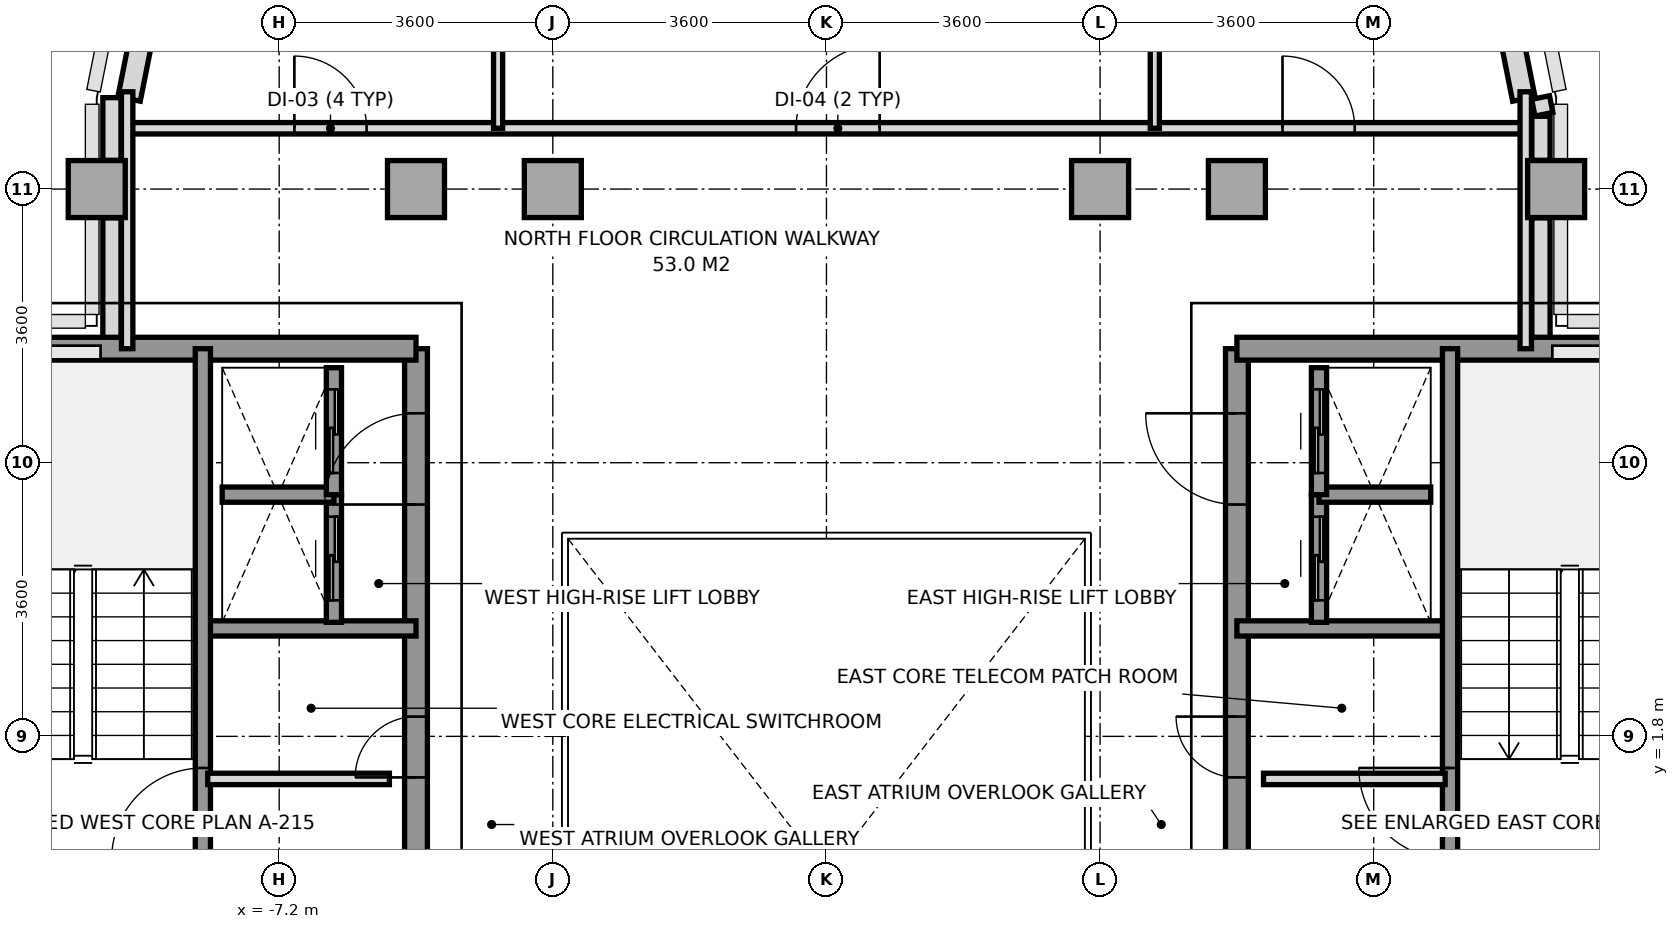
"""IFC4 building model, lengths in metres.
Left out: names, types, materials, properties, quantities, classifications, styles, units other than length and angle.
Written with IfcOpenShell. Run it as: python <this file> out.ifc"""

import sys

from ifc_helpers import new_model, si_unit, direction, frame, frame_2d, origin, origin_2d, place, context, subcontext, project, spatial, rectangle, extrude, source, transform, mapped, element, fill, save


model = new_model("IFC4")
c1 = context("Model", 3, precision=1e-05, world=origin(), true_north=direction((0.0, 1.0)))
c2 = subcontext(c1, "Body", "Model", "MODEL_VIEW")
j1 = project(units=[si_unit("LENGTHUNIT", "METRE"), si_unit("PLANEANGLEUNIT", "RADIAN")], contexts=[c1])
p1 = place(None, origin())
s1 = spatial("IfcSite", under=j1, at=p1, CompositionType="ELEMENT")
p2 = place(p1, origin())
s2 = spatial("IfcBuilding", under=s1, at=p2, CompositionType="ELEMENT")
p3 = place(p2, frame((0.0, 0.0, 268.4)))
s3 = spatial("IfcBuildingStorey", under=s2, at=p3, CompositionType="ELEMENT", Elevation=268.4)
m1 = source(origin(), c2, "Body", "SweptSolid", [
    extrude(rectangle(XDim=0.75, YDim=0.75, at=origin_2d()), origin(), (0.0, 0.0, 1.0), 2.96),
])
for number, where, z_axis, x_axis in (
    (1, (-9.6, 9.0, 0.0), (0.0, 0.0, 1.0), (1.0, 0.0, 0.0)),
    (2, (-5.4, 9.0, 0.0), (0.0, 0.0, 1.0), (1.0, 0.0, 0.0)),
    (3, (-3.6, 9.0, 0.0), (0.0, 0.0, 1.0), (1.0, 0.0, 0.0)),
    (4, (3.6, 9.0, 0.0), (0.0, 0.0, 1.0), (1.0, 0.0, 0.0)),
    (5, (5.4, 9.0, 0.0), (0.0, 0.0, 1.0), (1.0, 0.0, 0.0)),
    (6, (9.6, 9.0, 0.0), (0.0, 0.0, 1.0), (1.0, 0.0, 0.0)),
):
    element("IfcColumn", number, at=place(p3, frame(where, z_axis=z_axis, x_axis=x_axis)), inside=s3, PredefinedType="COLUMN", context=c2, shape_type="MappedRepresentation", body=[
        mapped(m1, transform((0.0, 0.0, 0.0), x_axis=(1.0, 0.0, 0.0), y_axis=(0.0, 1.0, 0.0), z_axis=(0.0, 0.0, 1.0), scale=1.0)),
    ])
for number, where, z_axis, x_axis in (
    (7, (9.175, 10.185, 0.0), (0.0, 0.0, 1.0), (-0.195, 0.981, 0.0)),
    (8, (-8.471, 13.725, 0.0), (0.0, 0.0, 1.0), (-0.195, -0.981, 0.0)),
):
    element("IfcWall", number, at=place(p3, frame(where, z_axis=z_axis, x_axis=x_axis)), inside=s3, PredefinedType="SOLIDWALL", context=c2, shape_type="SweptSolid", body=[
        extrude(rectangle(XDim=3.609, YDim=0.3, at=frame_2d((1.804, 0.0))), origin(), (0.0, 0.0, 1.0), 2.96),
    ])
p4 = place(p3, frame((-9.4, 6.953, 0.0), z_axis=(0.0, 0.0, 1.0), x_axis=(0.0, 1.0, 0.0)))
e9 = element("IfcWall", 9, at=p4, inside=s3, PredefinedType="PARAPET", context=c2, shape_type="SweptSolid", body=[
    extrude(rectangle(XDim=1.669, YDim=0.24, at=frame_2d((0.834, 0.0))), origin(), (0.0, 0.0, 1.0), 1.15),
])
p5 = place(p3, frame((-9.4, 9.378, 0.0), z_axis=(0.0, 0.0, 1.0), x_axis=(0.0, 1.0, 0.0)))
e10 = element("IfcWall", 10, at=p5, inside=s3, PredefinedType="PARAPET", context=c2, shape_type="SweptSolid", body=[
    extrude(rectangle(XDim=0.825, YDim=0.24, at=frame_2d((0.413, 0.0))), origin(), (0.0, 0.0, 1.0), 1.15),
])
p6 = place(p3, frame((9.395, 10.204, 0.0), z_axis=(0.0, 0.0, 1.0), x_axis=(0.194859894132, -0.980831087221, 0.0)))
e11 = element("IfcWall", 11, at=p6, inside=s3, PredefinedType="PARAPET", context=c2, shape_type="SweptSolid", body=[
    extrude(rectangle(XDim=0.224, YDim=0.24, at=frame_2d((0.112, 0.0))), origin(), (0.0, 0.0, 1.0), 1.15),
])
p7 = place(p3, frame((9.4, 9.958, 0.0), z_axis=(0.0, 0.0, 1.0), x_axis=(0.0, -1.0, 0.0)))
e12 = element("IfcWall", 12, at=p7, inside=s3, PredefinedType="PARAPET", context=c2, shape_type="SweptSolid", body=[
    extrude(rectangle(XDim=0.58, YDim=0.24, at=frame_2d((0.29, 0.0))), origin(), (0.0, 0.0, 1.0), 1.15),
])
p8 = place(p3, frame((9.4, 8.622, 0.0), z_axis=(0.0, 0.0, 1.0), x_axis=(0.0, -1.0, 0.0)))
e13 = element("IfcWall", 13, at=p8, inside=s3, PredefinedType="PARAPET", context=c2, shape_type="SweptSolid", body=[
    extrude(rectangle(XDim=1.669, YDim=0.24, at=frame_2d((0.834, 0.0))), origin(), (0.0, 0.0, 1.0), 1.15),
])
p9 = place(p3, frame((-5.4, -5.6, 0.0), z_axis=(0.0, 0.0, 1.0), x_axis=(0.0, 1.0, 0.0)))
e14 = element("IfcWall", 14, at=p9, inside=s3, PredefinedType="SHEAR", context=c2, shape_type="SweptSolid", body=[
    extrude(rectangle(XDim=12.5, YDim=0.3, at=frame_2d((6.25, 0.0))), origin(), (0.0, 0.0, 1.0), 2.96),
])
p10 = place(p9, frame((4.55, 0.0, 0.0)))
e15 = element("IfcOpeningElement", 15, at=p10, cuts=e14, PredefinedType="OPENING", context=c2, shape_type="SweptSolid", body=[
    extrude(rectangle(XDim=1.2, YDim=2.2, at=frame_2d((0.6, 1.1))), frame((0.0, 0.16, 0.0), z_axis=(0.0, -1.0, 0.0), x_axis=(1.0, 0.0, 0.0)), (0.0, 0.0, 1.0), 0.32),
])
p11 = place(p9, frame((10.45, 0.0, 0.0)))
e16 = element("IfcOpeningElement", 16, at=p11, cuts=e14, PredefinedType="OPENING", context=c2, shape_type="SweptSolid", body=[
    extrude(rectangle(XDim=1.2, YDim=2.2, at=frame_2d((0.6, 1.1))), frame((0.0, 0.16, 0.0), z_axis=(0.0, -1.0, 0.0), x_axis=(1.0, 0.0, 0.0)), (0.0, 0.0, 1.0), 0.32),
])
p12 = place(p9, frame((6.86, 0.0, 0.0)))
e17 = element("IfcOpeningElement", 17, at=p12, cuts=e14, PredefinedType="OPENING", context=c2, shape_type="SweptSolid", body=[
    extrude(rectangle(XDim=0.8, YDim=2.1, at=frame_2d((0.4, 1.05))), frame((0.0, 0.16, 0.0), z_axis=(0.0, -1.0, 0.0), x_axis=(1.0, 0.0, 0.0)), (0.0, 0.0, 1.0), 0.32),
])
p13 = place(p3, frame((-11.356, 6.9, 0.0), z_axis=(0.0, 0.0, 1.0), x_axis=(1.0, 0.0, 0.0)))
e18 = element("IfcWall", 18, at=p13, inside=s3, PredefinedType="SHEAR", context=c2, shape_type="SweptSolid", body=[
    extrude(rectangle(XDim=5.956, YDim=0.3, at=frame_2d((2.978, 0.0))), origin(), (0.0, 0.0, 1.0), 2.96),
])
p14 = place(p3, frame((-8.18, 3.22, 0.0), z_axis=(0.0, 0.0, 1.0), x_axis=(1.0, 0.0, 0.0)))
e19 = element("IfcWall", 19, at=p14, inside=s3, PredefinedType="SOLIDWALL", context=c2, shape_type="SweptSolid", body=[
    extrude(rectangle(XDim=2.78, YDim=0.2, at=frame_2d((1.39, 0.0))), origin(), (0.0, 0.0, 1.0), 2.96),
])
p15 = place(p3, frame((-8.204, -0.016, 0.0), z_axis=(0.0, 0.0, 1.0), x_axis=(0.0, 1.0, 0.0)))
e20 = element("IfcWall", 20, at=p15, inside=s3, PredefinedType="SOLIDWALL", context=c2, shape_type="SweptSolid", body=[
    extrude(rectangle(XDim=6.916, YDim=0.2, at=frame_2d((3.458, 0.0))), origin(), (0.0, 0.0, 1.0), 2.96),
])
p16 = place(p15, frame((0.2, 0.0, 0.0)))
e21 = element("IfcOpeningElement", 21, at=p16, cuts=e20, PredefinedType="OPENING", context=c2, shape_type="SweptSolid", body=[
    extrude(rectangle(XDim=1.2, YDim=2.2, at=frame_2d((0.6, 1.1))), frame((0.0, 0.11, 0.0), z_axis=(0.0, -1.0, 0.0), x_axis=(1.0, 0.0, 0.0)), (0.0, 0.0, 1.0), 0.22),
])
p17 = place(p3, frame((5.4, -5.6, 0.0), z_axis=(0.0, 0.0, 1.0), x_axis=(0.0, 1.0, 0.0)))
e22 = element("IfcWall", 22, at=p17, inside=s3, PredefinedType="SHEAR", context=c2, shape_type="SweptSolid", body=[
    extrude(rectangle(XDim=12.5, YDim=0.3, at=frame_2d((6.25, 0.0))), origin(), (0.0, 0.0, 1.0), 2.96),
])
p18 = place(p17, frame((4.55, 0.0, 0.0)))
e23 = element("IfcOpeningElement", 23, at=p18, cuts=e22, PredefinedType="OPENING", context=c2, shape_type="SweptSolid", body=[
    extrude(rectangle(XDim=1.2, YDim=2.2, at=frame_2d((0.6, 1.1))), frame((0.0, 0.16, 0.0), z_axis=(0.0, -1.0, 0.0), x_axis=(1.0, 0.0, 0.0)), (0.0, 0.0, 1.0), 0.32),
])
p19 = place(p17, frame((10.45, 0.0, 0.0)))
e24 = element("IfcOpeningElement", 24, at=p19, cuts=e22, PredefinedType="OPENING", context=c2, shape_type="SweptSolid", body=[
    extrude(rectangle(XDim=1.2, YDim=2.2, at=frame_2d((0.6, 1.1))), frame((0.0, 0.16, 0.0), z_axis=(0.0, -1.0, 0.0), x_axis=(1.0, 0.0, 0.0)), (0.0, 0.0, 1.0), 0.32),
])
p20 = place(p17, frame((6.86, 0.0, 0.0)))
e25 = element("IfcOpeningElement", 25, at=p20, cuts=e22, PredefinedType="OPENING", context=c2, shape_type="SweptSolid", body=[
    extrude(rectangle(XDim=0.8, YDim=2.1, at=frame_2d((0.4, 1.05))), frame((0.0, 0.16, 0.0), z_axis=(0.0, -1.0, 0.0), x_axis=(1.0, 0.0, 0.0)), (0.0, 0.0, 1.0), 0.32),
])
p21 = place(p3, frame((5.4, 6.9, 0.0), z_axis=(0.0, 0.0, 1.0), x_axis=(1.0, 0.0, 0.0)))
e26 = element("IfcWall", 26, at=p21, inside=s3, PredefinedType="SHEAR", context=c2, shape_type="SweptSolid", body=[
    extrude(rectangle(XDim=5.956, YDim=0.3, at=frame_2d((2.978, 0.0))), origin(), (0.0, 0.0, 1.0), 2.96),
])
p22 = place(p3, frame((5.4, 3.22, 0.0), z_axis=(0.0, 0.0, 1.0), x_axis=(1.0, 0.0, 0.0)))
e27 = element("IfcWall", 27, at=p22, inside=s3, PredefinedType="SOLIDWALL", context=c2, shape_type="SweptSolid", body=[
    extrude(rectangle(XDim=2.78, YDim=0.2, at=frame_2d((1.39, 0.0))), origin(), (0.0, 0.0, 1.0), 2.96),
])
p23 = place(p3, frame((8.204, -0.016, 0.0), z_axis=(0.0, 0.0, 1.0), x_axis=(0.0, 1.0, 0.0)))
e28 = element("IfcWall", 28, at=p23, inside=s3, PredefinedType="SOLIDWALL", context=c2, shape_type="SweptSolid", body=[
    extrude(rectangle(XDim=6.916, YDim=0.2, at=frame_2d((3.458, 0.0))), origin(), (0.0, 0.0, 1.0), 2.96),
])
p24 = place(p23, frame((0.2, 0.0, 0.0)))
e29 = element("IfcOpeningElement", 29, at=p24, cuts=e28, PredefinedType="OPENING", context=c2, shape_type="SweptSolid", body=[
    extrude(rectangle(XDim=1.2, YDim=2.2, at=frame_2d((0.6, 1.1))), frame((0.0, 0.11, 0.0), z_axis=(0.0, -1.0, 0.0), x_axis=(1.0, 0.0, 0.0)), (0.0, 0.0, 1.0), 0.22),
])
p25 = place(p3, frame((-6.48, 3.3, 0.0), z_axis=(0.0, 0.0, 1.0), x_axis=(0.0, 1.0, 0.0)))
e30 = element("IfcWall", 30, at=p25, inside=s3, PredefinedType="SOLIDWALL", context=c2, shape_type="SweptSolid", body=[
    extrude(rectangle(XDim=1.68, YDim=0.2, at=frame_2d((0.84, 0.0))), origin(), (0.0, 0.0, 1.0), 2.96),
])
p26 = place(p25, frame((0.29, 0.0, 0.0)))
e31 = element("IfcOpeningElement", 31, at=p26, cuts=e30, PredefinedType="OPENING", context=c2, shape_type="SweptSolid", body=[
    extrude(rectangle(XDim=1.1, YDim=2.2, at=frame_2d((0.55, 1.1))), frame((0.0, 0.11, 0.0), z_axis=(0.0, -1.0, 0.0), x_axis=(1.0, 0.0, 0.0)), (0.0, 0.0, 1.0), 0.22),
])
p27 = place(p3, frame((-7.95, 4.98, 0.0), z_axis=(0.0, 0.0, 1.0), x_axis=(1.0, 0.0, 0.0)))
e32 = element("IfcWall", 32, at=p27, inside=s3, PredefinedType="SOLIDWALL", context=c2, shape_type="SweptSolid", body=[
    extrude(rectangle(XDim=1.47, YDim=0.2, at=frame_2d((0.735, 0.0))), origin(), (0.0, 0.0, 1.0), 2.96),
])
p28 = place(p3, frame((-6.48, 4.98, 0.0), z_axis=(0.0, 0.0, 1.0), x_axis=(0.0, 1.0, 0.0)))
e33 = element("IfcWall", 33, at=p28, inside=s3, PredefinedType="SOLIDWALL", context=c2, shape_type="SweptSolid", body=[
    extrude(rectangle(XDim=1.67, YDim=0.2, at=frame_2d((0.835, 0.0))), origin(), (0.0, 0.0, 1.0), 2.96),
])
p29 = place(p28, frame((0.285, 0.0, 0.0)))
e34 = element("IfcOpeningElement", 34, at=p29, cuts=e33, PredefinedType="OPENING", context=c2, shape_type="SweptSolid", body=[
    extrude(rectangle(XDim=1.1, YDim=2.2, at=frame_2d((0.55, 1.1))), frame((0.0, 0.11, 0.0), z_axis=(0.0, -1.0, 0.0), x_axis=(1.0, 0.0, 0.0)), (0.0, 0.0, 1.0), 0.22),
])
p30 = place(p3, frame((6.48, 3.3, 0.0), z_axis=(0.0, 0.0, 1.0), x_axis=(0.0, 1.0, 0.0)))
e35 = element("IfcWall", 35, at=p30, inside=s3, PredefinedType="SOLIDWALL", context=c2, shape_type="SweptSolid", body=[
    extrude(rectangle(XDim=1.68, YDim=0.2, at=frame_2d((0.84, 0.0))), origin(), (0.0, 0.0, 1.0), 2.96),
])
p31 = place(p30, frame((0.29, 0.0, 0.0)))
e36 = element("IfcOpeningElement", 36, at=p31, cuts=e35, PredefinedType="OPENING", context=c2, shape_type="SweptSolid", body=[
    extrude(rectangle(XDim=1.1, YDim=2.2, at=frame_2d((0.55, 1.1))), frame((0.0, 0.11, 0.0), z_axis=(0.0, -1.0, 0.0), x_axis=(1.0, 0.0, 0.0)), (0.0, 0.0, 1.0), 0.22),
])
p32 = place(p3, frame((6.48, 4.98, 0.0), z_axis=(0.0, 0.0, 1.0), x_axis=(1.0, 0.0, 0.0)))
e37 = element("IfcWall", 37, at=p32, inside=s3, PredefinedType="SOLIDWALL", context=c2, shape_type="SweptSolid", body=[
    extrude(rectangle(XDim=1.47, YDim=0.2, at=frame_2d((0.735, 0.0))), origin(), (0.0, 0.0, 1.0), 2.96),
])
p33 = place(p3, frame((6.48, 4.98, 0.0), z_axis=(0.0, 0.0, 1.0), x_axis=(0.0, 1.0, 0.0)))
e38 = element("IfcWall", 38, at=p33, inside=s3, PredefinedType="SOLIDWALL", context=c2, shape_type="SweptSolid", body=[
    extrude(rectangle(XDim=1.67, YDim=0.2, at=frame_2d((0.835, 0.0))), origin(), (0.0, 0.0, 1.0), 2.96),
])
p34 = place(p33, frame((0.285, 0.0, 0.0)))
e39 = element("IfcOpeningElement", 39, at=p34, cuts=e38, PredefinedType="OPENING", context=c2, shape_type="SweptSolid", body=[
    extrude(rectangle(XDim=1.1, YDim=2.2, at=frame_2d((0.55, 1.1))), frame((0.0, 0.11, 0.0), z_axis=(0.0, -1.0, 0.0), x_axis=(1.0, 0.0, 0.0)), (0.0, 0.0, 1.0), 0.22),
])
for number, where, z_axis, x_axis in (
    (40, (-8.14, 1.24, 0.0), (0.0, 0.0, 1.0), (1.0, 0.0, 0.0)),
    (41, (5.75, 1.24, 0.0), (0.0, 0.0, 1.0), (1.0, 0.0, 0.0)),
):
    element("IfcWall", number, at=place(p3, frame(where, z_axis=z_axis, x_axis=x_axis)), inside=s3, PredefinedType="PARTITIONING", context=c2, shape_type="SweptSolid", body=[
        extrude(rectangle(XDim=2.39, YDim=0.15, at=frame_2d((1.195, 0.0))), origin(), (0.0, 0.0, 1.0), 2.96),
    ])
p35 = place(p3, frame((-9.2, 9.8, 0.0), z_axis=(0.0, 0.0, 1.0), x_axis=(1.0, 0.0, 0.0)))
e42 = element("IfcWall", 42, at=p35, inside=s3, PredefinedType="PARTITIONING", context=c2, shape_type="SweptSolid", body=[
    extrude(rectangle(XDim=18.4, YDim=0.15, at=frame_2d((9.2, 0.0))), origin(), (0.0, 0.0, 1.0), 2.96),
])
p36 = place(p35, frame((2.2, 0.0, 0.0)))
e43 = element("IfcOpeningElement", 43, at=p36, cuts=e42, PredefinedType="OPENING", context=c2, shape_type="SweptSolid", body=[
    extrude(rectangle(XDim=0.95, YDim=2.15, at=frame_2d((0.475, 1.075))), frame((0.0, 0.085, 0.0), z_axis=(0.0, -1.0, 0.0), x_axis=(1.0, 0.0, 0.0)), (0.0, 0.0, 1.0), 0.17),
])
p37 = place(p35, frame((8.8, 0.0, 0.0)))
e44 = element("IfcOpeningElement", 44, at=p37, cuts=e42, PredefinedType="OPENING", context=c2, shape_type="SweptSolid", body=[
    extrude(rectangle(XDim=1.1, YDim=2.2, at=frame_2d((0.55, 1.1))), frame((0.0, 0.085, 0.0), z_axis=(0.0, -1.0, 0.0), x_axis=(1.0, 0.0, 0.0)), (0.0, 0.0, 1.0), 0.17),
])
p38 = place(p35, frame((15.2, 0.0, 0.0)))
e45 = element("IfcOpeningElement", 45, at=p38, cuts=e42, PredefinedType="OPENING", context=c2, shape_type="SweptSolid", body=[
    extrude(rectangle(XDim=0.95, YDim=2.15, at=frame_2d((0.475, 1.075))), frame((0.0, 0.085, 0.0), z_axis=(0.0, -1.0, 0.0), x_axis=(1.0, 0.0, 0.0)), (0.0, 0.0, 1.0), 0.17),
])
for number, where, z_axis, x_axis in (
    (46, (-9.2, 6.9, 0.0), (0.0, 0.0, 1.0), (0.0, 1.0, 0.0)),
    (47, (9.2, 6.9, 0.0), (0.0, 0.0, 1.0), (0.0, 1.0, 0.0)),
):
    element("IfcWall", number, at=place(p3, frame(where, z_axis=z_axis, x_axis=x_axis)), inside=s3, PredefinedType="PARTITIONING", context=c2, shape_type="SweptSolid", body=[
        extrude(rectangle(XDim=3.38, YDim=0.15, at=frame_2d((1.69, 0.0))), origin(), (0.0, 0.0, 1.0), 2.56),
    ])
for number, where, z_axis, x_axis in (
    (48, (-4.32, 9.8, 0.0), (0.0, 0.0, 1.0), (0.0, 1.0, 0.0)),
    (49, (4.32, 9.8, 0.0), (0.0, 0.0, 1.0), (0.0, 1.0, 0.0)),
):
    element("IfcWall", number, at=place(p3, frame(where, z_axis=z_axis, x_axis=x_axis)), inside=s3, PredefinedType="PARTITIONING", context=c2, shape_type="SweptSolid", body=[
        extrude(rectangle(XDim=9.45, YDim=0.12, at=frame_2d((4.725, 0.0))), origin(), (0.0, 0.0, 1.0), 2.56),
    ])
m2 = source(origin(), c2, "Body", "SweptSolid", [
    extrude(rectangle(XDim=1.2, YDim=2.2, at=frame_2d((0.6, 1.1))), frame((0.0, 0.025, 0.0), z_axis=(0.0, -1.0, 0.0), x_axis=(1.0, 0.0, 0.0)), (0.0, 0.0, 1.0), 0.05),
])
p39 = place(p16, origin())
e50 = element("IfcDoor", 50, at=p39, inside=s3, OperationType="SINGLE_SWING_LEFT", PredefinedType="DOOR", context=c2, shape_type="MappedRepresentation", body=[
    mapped(m2, transform((0.0, 0.0, 0.0), x_axis=(1.0, 0.0, 0.0), y_axis=(0.0, 1.0, 0.0), z_axis=(0.0, 0.0, 1.0), scale=1.0)),
])
fill(e21, e50)
p40 = place(p11, origin())
e51 = element("IfcDoor", 51, at=p40, inside=s3, OperationType="SINGLE_SWING_LEFT", PredefinedType="DOOR", context=c2, shape_type="MappedRepresentation", body=[
    mapped(m2, transform((0.0, 0.0, 0.0), x_axis=(1.0, 0.0, 0.0), y_axis=(0.0, 1.0, 0.0), z_axis=(0.0, 0.0, 1.0), scale=1.0)),
])
fill(e16, e51)
p41 = place(p24, origin())
e52 = element("IfcDoor", 52, at=p41, inside=s3, OperationType="SINGLE_SWING_RIGHT", PredefinedType="DOOR", context=c2, shape_type="MappedRepresentation", body=[
    mapped(m2, transform((0.0, 0.0, 0.0), x_axis=(1.0, 0.0, 0.0), y_axis=(0.0, 1.0, 0.0), z_axis=(0.0, 0.0, 1.0), scale=1.0)),
])
fill(e29, e52)
p42 = place(p19, origin())
e53 = element("IfcDoor", 53, at=p42, inside=s3, OperationType="SINGLE_SWING_RIGHT", PredefinedType="DOOR", context=c2, shape_type="MappedRepresentation", body=[
    mapped(m2, transform((0.0, 0.0, 0.0), x_axis=(1.0, 0.0, 0.0), y_axis=(0.0, 1.0, 0.0), z_axis=(0.0, 0.0, 1.0), scale=1.0)),
])
fill(e24, e53)
m3 = source(origin(), c2, "Body", "SweptSolid", [
    extrude(rectangle(XDim=0.8, YDim=2.1, at=frame_2d((0.4, 1.05))), frame((0.0, 0.025, 0.0), z_axis=(0.0, -1.0, 0.0), x_axis=(1.0, 0.0, 0.0)), (0.0, 0.0, 1.0), 0.05),
])
p43 = place(p12, origin())
e54 = element("IfcDoor", 54, at=p43, inside=s3, OperationType="SINGLE_SWING_LEFT", PredefinedType="DOOR", context=c2, shape_type="MappedRepresentation", body=[
    mapped(m3, transform((0.0, 0.0, 0.0), x_axis=(1.0, 0.0, 0.0), y_axis=(0.0, 1.0, 0.0), z_axis=(0.0, 0.0, 1.0), scale=1.0)),
])
fill(e17, e54)
p44 = place(p20, origin())
e55 = element("IfcDoor", 55, at=p44, inside=s3, OperationType="SINGLE_SWING_RIGHT", PredefinedType="DOOR", context=c2, shape_type="MappedRepresentation", body=[
    mapped(m3, transform((0.0, 0.0, 0.0), x_axis=(1.0, 0.0, 0.0), y_axis=(0.0, 1.0, 0.0), z_axis=(0.0, 0.0, 1.0), scale=1.0)),
])
fill(e25, e55)
m4 = source(origin(), c2, "Body", "SweptSolid", [
    extrude(rectangle(XDim=1.1, YDim=2.2, at=frame_2d((0.55, 1.1))), frame((0.0, 0.025, 0.0), z_axis=(0.0, -1.0, 0.0), x_axis=(1.0, 0.0, 0.0)), (0.0, 0.0, 1.0), 0.05),
])
p45 = place(p26, origin())
e56 = element("IfcDoor", 56, at=p45, inside=s3, OperationType="SLIDING_TO_LEFT", PredefinedType="DOOR", context=c2, shape_type="MappedRepresentation", body=[
    mapped(m4, transform((0.0, 0.0, 0.0), x_axis=(1.0, 0.0, 0.0), y_axis=(0.0, 1.0, 0.0), z_axis=(0.0, 0.0, 1.0), scale=1.0)),
])
fill(e31, e56)
p46 = place(p29, origin())
e57 = element("IfcDoor", 57, at=p46, inside=s3, OperationType="SLIDING_TO_LEFT", PredefinedType="DOOR", context=c2, shape_type="MappedRepresentation", body=[
    mapped(m4, transform((0.0, 0.0, 0.0), x_axis=(1.0, 0.0, 0.0), y_axis=(0.0, 1.0, 0.0), z_axis=(0.0, 0.0, 1.0), scale=1.0)),
])
fill(e34, e57)
p47 = place(p31, origin())
e58 = element("IfcDoor", 58, at=p47, inside=s3, OperationType="SLIDING_TO_LEFT", PredefinedType="DOOR", context=c2, shape_type="MappedRepresentation", body=[
    mapped(m4, transform((0.0, 0.0, 0.0), x_axis=(1.0, 0.0, 0.0), y_axis=(0.0, 1.0, 0.0), z_axis=(0.0, 0.0, 1.0), scale=1.0)),
])
fill(e36, e58)
p48 = place(p34, origin())
e59 = element("IfcDoor", 59, at=p48, inside=s3, OperationType="SLIDING_TO_LEFT", PredefinedType="DOOR", context=c2, shape_type="MappedRepresentation", body=[
    mapped(m4, transform((0.0, 0.0, 0.0), x_axis=(1.0, 0.0, 0.0), y_axis=(0.0, 1.0, 0.0), z_axis=(0.0, 0.0, 1.0), scale=1.0)),
])
fill(e39, e59)
m5 = source(origin(), c2, "Body", "SweptSolid", [
    extrude(rectangle(XDim=0.95, YDim=2.15, at=frame_2d((0.475, 1.075))), frame((0.0, 0.025, 0.0), z_axis=(0.0, -1.0, 0.0), x_axis=(1.0, 0.0, 0.0)), (0.0, 0.0, 1.0), 0.05),
])
p49 = place(p36, origin())
e60 = element("IfcDoor", 60, at=p49, inside=s3, OperationType="SINGLE_SWING_LEFT", PredefinedType="DOOR", context=c2, shape_type="MappedRepresentation", body=[
    mapped(m5, transform((0.0, 0.0, 0.0), x_axis=(1.0, 0.0, 0.0), y_axis=(0.0, 1.0, 0.0), z_axis=(0.0, 0.0, 1.0), scale=1.0)),
])
fill(e43, e60)
p50 = place(p37, origin())
e61 = element("IfcDoor", 61, at=p50, inside=s3, OperationType="SINGLE_SWING_RIGHT", PredefinedType="DOOR", context=c2, shape_type="MappedRepresentation", body=[
    mapped(m4, transform((0.0, 0.0, 0.0), x_axis=(1.0, 0.0, 0.0), y_axis=(0.0, 1.0, 0.0), z_axis=(0.0, 0.0, 1.0), scale=1.0)),
])
fill(e44, e61)
p51 = place(p38, origin())
e62 = element("IfcDoor", 62, at=p51, inside=s3, OperationType="SINGLE_SWING_LEFT", PredefinedType="DOOR", context=c2, shape_type="MappedRepresentation", body=[
    mapped(m5, transform((0.0, 0.0, 0.0), x_axis=(1.0, 0.0, 0.0), y_axis=(0.0, 1.0, 0.0), z_axis=(0.0, 0.0, 1.0), scale=1.0)),
])
fill(e45, e62)
save(model, sys.argv[1])
